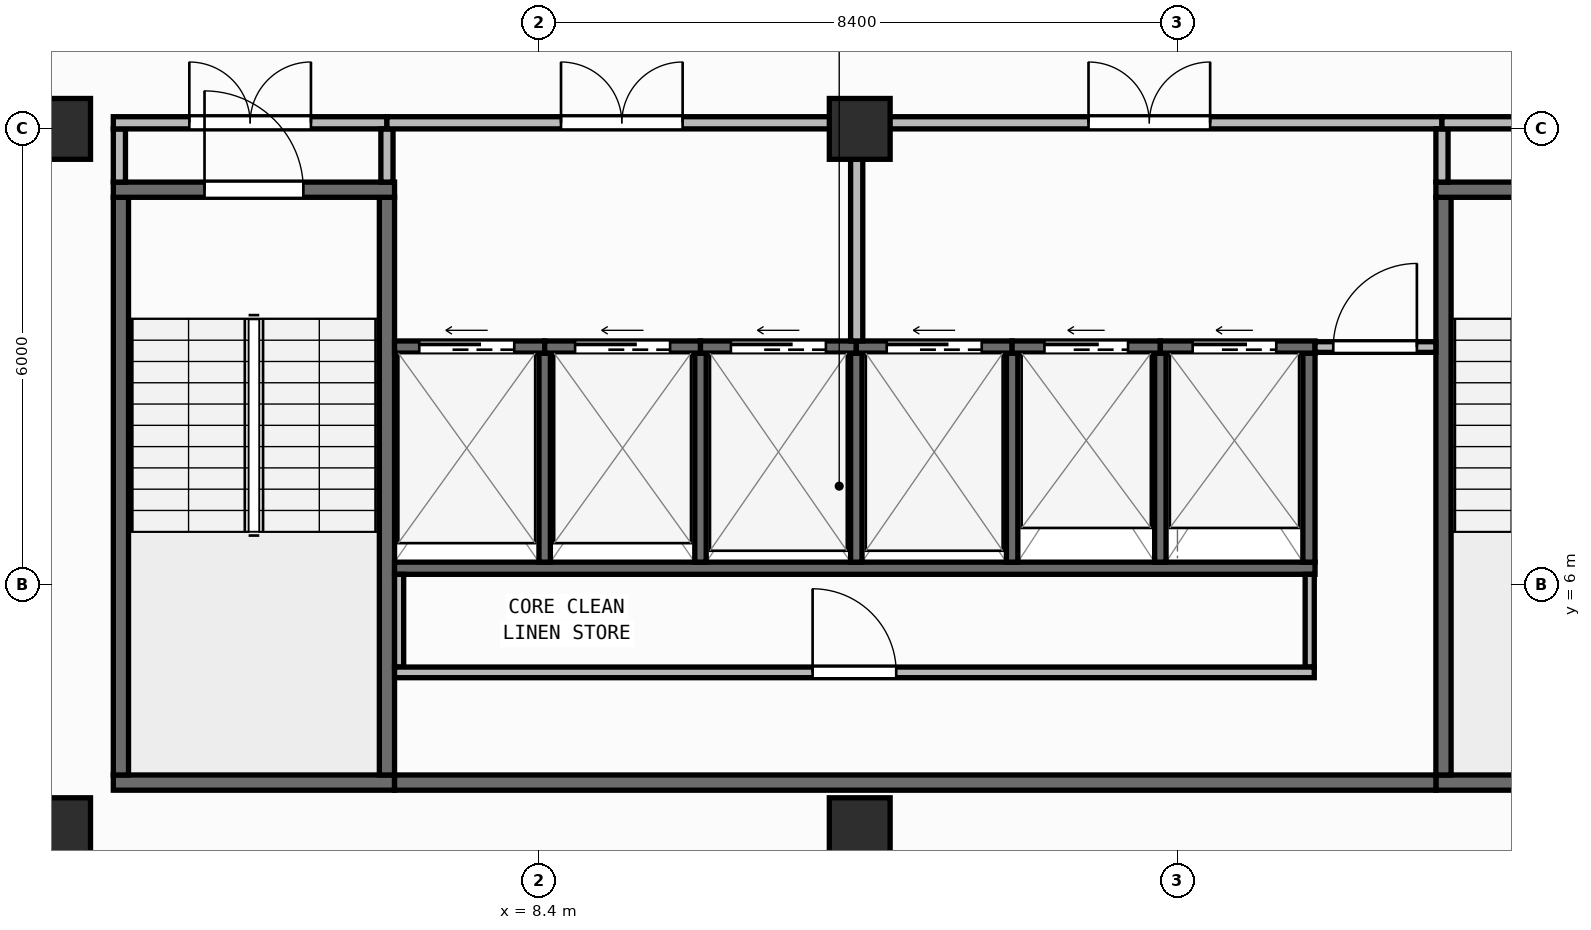
"""IFC4 building model, lengths in metres.
Left out: names, types, materials, properties, quantities, classifications, styles, units other than length and angle.
Written with IfcOpenShell. Run it as: python <this file> out.ifc"""

import sys

from ifc_helpers import new_model, si_unit, direction, frame, frame_2d, origin, origin_2d, place, context, subcontext, project, spatial, rectangle, extrude, element, fill, save


model = new_model("IFC4")
c1 = context("Model", 3, precision=1e-05, world=origin(), true_north=direction((0.0, 1.0)))
c2 = subcontext(c1, "Body", "Model", "MODEL_VIEW")
j1 = project(units=[si_unit("LENGTHUNIT", "METRE"), si_unit("PLANEANGLEUNIT", "RADIAN")], contexts=[c1])
p1 = place(None, origin())
s1 = spatial("IfcSite", under=j1, at=p1, CompositionType="ELEMENT")
p2 = place(p1, origin())
s2 = spatial("IfcBuilding", under=s1, at=p2, CompositionType="ELEMENT")
p3 = place(p2, frame((0.0, 0.0, 272.35)))
s3 = spatial("IfcBuildingStorey", under=s2, at=p3, CompositionType="ELEMENT", Elevation=272.35)
for number, where, z_axis, x_axis in (
    (1, (2.1, 2.8, 0.0), (0.0, 0.0, 1.0), (1.0, 0.0, 0.0)),
    (2, (12.62, 2.8, 0.0), (0.0, 0.0, 1.0), (1.0, 0.0, 0.0)),
    (3, (2.1, 12.0, 0.0), (0.0, 0.0, 1.0), (1.0, 0.0, 0.0)),
    (4, (12.62, 12.0, 0.0), (0.0, 0.0, 1.0), (1.0, 0.0, 0.0)),
):
    element("IfcColumn", number, at=place(p3, frame(where, z_axis=z_axis, x_axis=x_axis)), inside=s3, PredefinedType="COLUMN", context=c2, shape_type="SweptSolid", body=[
        extrude(rectangle(XDim=0.8, YDim=0.8, at=origin_2d()), origin(), (0.0, 0.0, 1.0), 3.95),
    ])
p4 = place(p3, frame((2.46, 0.172, 0.0), z_axis=(0.0, 0.0, 1.0), x_axis=(0.997289775118, 0.073573802713, 0.0)))
e5 = element("IfcWall", 5, at=p4, inside=s3, PredefinedType="STANDARD", context=c2, shape_type="SweptSolid", body=[
    extrude(rectangle(XDim=36.379, YDim=0.26, at=frame_2d((18.189, 0.0))), origin(), (0.0, 0.0, 1.0), 3.71),
])
p5 = place(p4, frame((16.989, 0.0, 0.9)))
e6 = element("IfcOpeningElement", 6, at=p5, cuts=e5, PredefinedType="OPENING", context=c2, shape_type="SweptSolid", body=[
    extrude(rectangle(XDim=2.4, YDim=1.65, at=frame_2d((1.2, 0.825))), frame((0.0, 0.14, 0.0), z_axis=(0.0, -1.0, 0.0), x_axis=(1.0, 0.0, 0.0)), (0.0, 0.0, 1.0), 0.28),
])
p6 = place(p3, frame((2.8, 3.4, 0.0), z_axis=(0.0, 0.0, 1.0), x_axis=(1.0, 0.0, 0.0)))
e7 = element("IfcWall", 7, at=p6, inside=s3, PredefinedType="SHEAR", context=c2, shape_type="SweptSolid", body=[
    extrude(rectangle(XDim=3.7, YDim=0.2, at=frame_2d((1.85, 0.0))), origin(), (0.0, 0.0, 1.0), 3.71),
])
for number, where, z_axis, x_axis in (
    (8, (2.9, 3.5, 0.0), (0.0, 0.0, 1.0), (0.0, 1.0, 0.0)),
    (9, (6.4, 3.5, 0.0), (0.0, 0.0, 1.0), (0.0, 1.0, 0.0)),
):
    element("IfcWall", number, at=place(p3, frame(where, z_axis=z_axis, x_axis=x_axis)), inside=s3, PredefinedType="SHEAR", context=c2, shape_type="SweptSolid", body=[
        extrude(rectangle(XDim=7.6, YDim=0.2, at=frame_2d((3.8, 0.0))), origin(), (0.0, 0.0, 1.0), 3.71),
    ])
p7 = place(p3, frame((2.8, 11.2, 0.0), z_axis=(0.0, 0.0, 1.0), x_axis=(1.0, 0.0, 0.0)))
e10 = element("IfcWall", 10, at=p7, inside=s3, PredefinedType="SHEAR", context=c2, shape_type="SweptSolid", body=[
    extrude(rectangle(XDim=3.7, YDim=0.2, at=frame_2d((1.85, 0.0))), origin(), (0.0, 0.0, 1.0), 3.71),
])
p8 = place(p7, frame((1.2, 0.0, 0.0)))
e11 = element("IfcOpeningElement", 11, at=p8, cuts=e10, PredefinedType="OPENING", context=c2, shape_type="SweptSolid", body=[
    extrude(rectangle(XDim=1.3, YDim=2.15, at=frame_2d((0.65, 1.075))), frame((0.0, 0.11, 0.0), z_axis=(0.0, -1.0, 0.0), x_axis=(1.0, 0.0, 0.0)), (0.0, 0.0, 1.0), 0.22),
])
p9 = place(p3, frame((20.2, 3.4, 0.0), z_axis=(0.0, 0.0, 1.0), x_axis=(1.0, 0.0, 0.0)))
e12 = element("IfcWall", 12, at=p9, inside=s3, PredefinedType="SHEAR", context=c2, shape_type="SweptSolid", body=[
    extrude(rectangle(XDim=3.7, YDim=0.2, at=frame_2d((1.85, 0.0))), origin(), (0.0, 0.0, 1.0), 3.71),
])
p10 = place(p3, frame((20.3, 3.5, 0.0), z_axis=(0.0, 0.0, 1.0), x_axis=(0.0, 1.0, 0.0)))
e13 = element("IfcWall", 13, at=p10, inside=s3, PredefinedType="SHEAR", context=c2, shape_type="SweptSolid", body=[
    extrude(rectangle(XDim=7.6, YDim=0.2, at=frame_2d((3.8, 0.0))), origin(), (0.0, 0.0, 1.0), 3.71),
])
p11 = place(p3, frame((20.2, 11.2, 0.0), z_axis=(0.0, 0.0, 1.0), x_axis=(1.0, 0.0, 0.0)))
e14 = element("IfcWall", 14, at=p11, inside=s3, PredefinedType="SHEAR", context=c2, shape_type="SweptSolid", body=[
    extrude(rectangle(XDim=3.7, YDim=0.2, at=frame_2d((1.85, 0.0))), origin(), (0.0, 0.0, 1.0), 3.71),
])
p12 = place(p11, frame((1.2, 0.0, 0.0)))
e15 = element("IfcOpeningElement", 15, at=p12, cuts=e14, PredefinedType="OPENING", context=c2, shape_type="SweptSolid", body=[
    extrude(rectangle(XDim=1.3, YDim=2.15, at=frame_2d((0.65, 1.075))), frame((0.0, 0.11, 0.0), z_axis=(0.0, -1.0, 0.0), x_axis=(1.0, 0.0, 0.0)), (0.0, 0.0, 1.0), 0.22),
])
p13 = place(p3, frame((6.5, 3.4, 0.0), z_axis=(0.0, 0.0, 1.0), x_axis=(1.0, 0.0, 0.0)))
e16 = element("IfcWall", 16, at=p13, inside=s3, PredefinedType="SHEAR", context=c2, shape_type="SweptSolid", body=[
    extrude(rectangle(XDim=13.7, YDim=0.2, at=frame_2d((6.85, 0.0))), origin(), (0.0, 0.0, 1.0), 3.71),
])
p14 = place(p3, frame((6.5, 6.22, 0.0), z_axis=(0.0, 0.0, 1.0), x_axis=(1.0, 0.0, 0.0)))
e17 = element("IfcWall", 17, at=p14, inside=s3, PredefinedType="SHEAR", context=c2, shape_type="SweptSolid", body=[
    extrude(rectangle(XDim=12.11, YDim=0.16, at=frame_2d((6.055, 0.0))), origin(), (0.0, 0.0, 1.0), 3.71),
])
p15 = place(p3, frame((18.53, 6.3, 0.0), z_axis=(0.0, 0.0, 1.0), x_axis=(0.0, 1.0, 0.0)))
e18 = element("IfcWall", 18, at=p15, inside=s3, PredefinedType="SHEAR", context=c2, shape_type="SweptSolid", body=[
    extrude(rectangle(XDim=2.75, YDim=0.16, at=frame_2d((1.375, 0.0))), origin(), (0.0, 0.0, 1.0), 3.71),
])
for number, where, z_axis, x_axis in (
    (19, (8.475, 6.3, 0.0), (0.0, 0.0, 1.0), (0.0, 1.0, 0.0)),
    (20, (10.525, 6.3, 0.0), (0.0, 0.0, 1.0), (0.0, 1.0, 0.0)),
    (21, (12.575, 6.3, 0.0), (0.0, 0.0, 1.0), (0.0, 1.0, 0.0)),
    (22, (14.625, 6.3, 0.0), (0.0, 0.0, 1.0), (0.0, 1.0, 0.0)),
    (23, (16.575, 6.3, 0.0), (0.0, 0.0, 1.0), (0.0, 1.0, 0.0)),
):
    element("IfcWall", number, at=place(p3, frame(where, z_axis=z_axis, x_axis=x_axis)), inside=s3, PredefinedType="SHEAR", context=c2, shape_type="SweptSolid", body=[
        extrude(rectangle(XDim=2.75, YDim=0.15, at=frame_2d((1.375, 0.0))), origin(), (0.0, 0.0, 1.0), 3.71),
    ])
p16 = place(p3, frame((6.5, 9.13, 0.0), z_axis=(0.0, 0.0, 1.0), x_axis=(1.0, 0.0, 0.0)))
e24 = element("IfcWall", 24, at=p16, inside=s3, PredefinedType="SHEAR", context=c2, shape_type="SweptSolid", body=[
    extrude(rectangle(XDim=1.975, YDim=0.16, at=frame_2d((0.988, 0.0))), origin(), (0.0, 0.0, 1.0), 3.71),
])
p17 = place(p16, frame((0.325, 0.0, 0.0)))
e25 = element("IfcOpeningElement", 25, at=p17, cuts=e24, PredefinedType="OPENING", context=c2, shape_type="SweptSolid", body=[
    extrude(rectangle(XDim=1.25, YDim=2.15, at=frame_2d((0.625, 1.075))), frame((0.0, 0.09, 0.0), z_axis=(0.0, -1.0, 0.0), x_axis=(1.0, 0.0, 0.0)), (0.0, 0.0, 1.0), 0.18),
])
p18 = place(p3, frame((8.475, 9.13, 0.0), z_axis=(0.0, 0.0, 1.0), x_axis=(1.0, 0.0, 0.0)))
e26 = element("IfcWall", 26, at=p18, inside=s3, PredefinedType="SHEAR", context=c2, shape_type="SweptSolid", body=[
    extrude(rectangle(XDim=2.05, YDim=0.16, at=frame_2d((1.025, 0.0))), origin(), (0.0, 0.0, 1.0), 3.71),
])
p19 = place(p18, frame((0.4, 0.0, 0.0)))
e27 = element("IfcOpeningElement", 27, at=p19, cuts=e26, PredefinedType="OPENING", context=c2, shape_type="SweptSolid", body=[
    extrude(rectangle(XDim=1.25, YDim=2.15, at=frame_2d((0.625, 1.075))), frame((0.0, 0.09, 0.0), z_axis=(0.0, -1.0, 0.0), x_axis=(1.0, 0.0, 0.0)), (0.0, 0.0, 1.0), 0.18),
])
p20 = place(p3, frame((10.525, 9.13, 0.0), z_axis=(0.0, 0.0, 1.0), x_axis=(1.0, 0.0, 0.0)))
e28 = element("IfcWall", 28, at=p20, inside=s3, PredefinedType="SHEAR", context=c2, shape_type="SweptSolid", body=[
    extrude(rectangle(XDim=2.05, YDim=0.16, at=frame_2d((1.025, 0.0))), origin(), (0.0, 0.0, 1.0), 3.71),
])
p21 = place(p20, frame((0.4, 0.0, 0.0)))
e29 = element("IfcOpeningElement", 29, at=p21, cuts=e28, PredefinedType="OPENING", context=c2, shape_type="SweptSolid", body=[
    extrude(rectangle(XDim=1.25, YDim=2.15, at=frame_2d((0.625, 1.075))), frame((0.0, 0.09, 0.0), z_axis=(0.0, -1.0, 0.0), x_axis=(1.0, 0.0, 0.0)), (0.0, 0.0, 1.0), 0.18),
])
p22 = place(p3, frame((12.575, 9.13, 0.0), z_axis=(0.0, 0.0, 1.0), x_axis=(1.0, 0.0, 0.0)))
e30 = element("IfcWall", 30, at=p22, inside=s3, PredefinedType="SHEAR", context=c2, shape_type="SweptSolid", body=[
    extrude(rectangle(XDim=2.05, YDim=0.16, at=frame_2d((1.025, 0.0))), origin(), (0.0, 0.0, 1.0), 3.71),
])
p23 = place(p22, frame((0.4, 0.0, 0.0)))
e31 = element("IfcOpeningElement", 31, at=p23, cuts=e30, PredefinedType="OPENING", context=c2, shape_type="SweptSolid", body=[
    extrude(rectangle(XDim=1.25, YDim=2.15, at=frame_2d((0.625, 1.075))), frame((0.0, 0.09, 0.0), z_axis=(0.0, -1.0, 0.0), x_axis=(1.0, 0.0, 0.0)), (0.0, 0.0, 1.0), 0.18),
])
p24 = place(p3, frame((14.625, 9.13, 0.0), z_axis=(0.0, 0.0, 1.0), x_axis=(1.0, 0.0, 0.0)))
e32 = element("IfcWall", 32, at=p24, inside=s3, PredefinedType="SHEAR", context=c2, shape_type="SweptSolid", body=[
    extrude(rectangle(XDim=1.95, YDim=0.16, at=frame_2d((0.975, 0.0))), origin(), (0.0, 0.0, 1.0), 3.71),
])
p25 = place(p24, frame((0.425, 0.0, 0.0)))
e33 = element("IfcOpeningElement", 33, at=p25, cuts=e32, PredefinedType="OPENING", context=c2, shape_type="SweptSolid", body=[
    extrude(rectangle(XDim=1.1, YDim=2.15, at=frame_2d((0.55, 1.075))), frame((0.0, 0.09, 0.0), z_axis=(0.0, -1.0, 0.0), x_axis=(1.0, 0.0, 0.0)), (0.0, 0.0, 1.0), 0.18),
])
p26 = place(p3, frame((16.575, 9.13, 0.0), z_axis=(0.0, 0.0, 1.0), x_axis=(1.0, 0.0, 0.0)))
e34 = element("IfcWall", 34, at=p26, inside=s3, PredefinedType="SHEAR", context=c2, shape_type="SweptSolid", body=[
    extrude(rectangle(XDim=2.035, YDim=0.16, at=frame_2d((1.018, 0.0))), origin(), (0.0, 0.0, 1.0), 3.71),
])
p27 = place(p26, frame((0.425, 0.0, 0.0)))
e35 = element("IfcOpeningElement", 35, at=p27, cuts=e34, PredefinedType="OPENING", context=c2, shape_type="SweptSolid", body=[
    extrude(rectangle(XDim=1.1, YDim=2.15, at=frame_2d((0.55, 1.075))), frame((0.0, 0.09, 0.0), z_axis=(0.0, -1.0, 0.0), x_axis=(1.0, 0.0, 0.0)), (0.0, 0.0, 1.0), 0.18),
])
for number, where, z_axis, x_axis in (
    (36, (6.56, 4.92, 0.0), (0.0, 0.0, 1.0), (0.0, 1.0, 0.0)),
    (37, (18.54, 4.92, 0.0), (0.0, 0.0, 1.0), (0.0, 1.0, 0.0)),
):
    element("IfcWall", number, at=place(p3, frame(where, z_axis=z_axis, x_axis=x_axis)), inside=s3, PredefinedType="PARTITIONING", context=c2, shape_type="SweptSolid", body=[
        extrude(rectangle(XDim=1.22, YDim=0.12, at=frame_2d((0.61, 0.0))), origin(), (0.0, 0.0, 1.0), 3.71),
    ])
p28 = place(p3, frame((6.5, 4.85, 0.0), z_axis=(0.0, 0.0, 1.0), x_axis=(1.0, 0.0, 0.0)))
e38 = element("IfcWall", 38, at=p28, inside=s3, PredefinedType="PARTITIONING", context=c2, shape_type="SweptSolid", body=[
    extrude(rectangle(XDim=12.1, YDim=0.14, at=frame_2d((6.05, 0.0))), origin(), (0.0, 0.0, 1.0), 3.71),
])
p29 = place(p28, frame((5.5, 0.0, 0.0)))
e39 = element("IfcOpeningElement", 39, at=p29, cuts=e38, PredefinedType="OPENING", context=c2, shape_type="SweptSolid", body=[
    extrude(rectangle(XDim=1.1, YDim=2.1, at=frame_2d((0.55, 1.05))), frame((0.0, 0.08, 0.0), z_axis=(0.0, -1.0, 0.0), x_axis=(1.0, 0.0, 0.0)), (0.0, 0.0, 1.0), 0.16),
])
p30 = place(p3, frame((18.61, 9.13, 0.0), z_axis=(0.0, 0.0, 1.0), x_axis=(1.0, 0.0, 0.0)))
e40 = element("IfcWall", 40, at=p30, inside=s3, PredefinedType="PARTITIONING", context=c2, shape_type="SweptSolid", body=[
    extrude(rectangle(XDim=1.59, YDim=0.14, at=frame_2d((0.795, 0.0))), origin(), (0.0, 0.0, 1.0), 3.71),
])
p31 = place(p30, frame((0.24, 0.0, 0.0)))
e41 = element("IfcOpeningElement", 41, at=p31, cuts=e40, PredefinedType="OPENING", context=c2, shape_type="SweptSolid", body=[
    extrude(rectangle(XDim=1.1, YDim=2.1, at=frame_2d((0.55, 1.05))), frame((0.0, 0.08, 0.0), z_axis=(0.0, -1.0, 0.0), x_axis=(1.0, 0.0, 0.0)), (0.0, 0.0, 1.0), 0.16),
])
p32 = place(p3, frame((2.88, 11.3, 0.0), z_axis=(0.0, 0.0, 1.0), x_axis=(0.0, 1.0, 0.0)))
e42 = element("IfcWall", 42, at=p32, inside=s3, PredefinedType="PARTITIONING", context=c2, shape_type="SweptSolid", body=[
    extrude(rectangle(XDim=0.7, YDim=0.16, at=frame_2d((0.35, 0.0))), origin(), (0.0, 0.0, 1.0), 3.71),
])
p33 = place(p3, frame((2.8, 12.08, 0.0), z_axis=(0.0, 0.0, 1.0), x_axis=(1.0, 0.0, 0.0)))
e43 = element("IfcWall", 43, at=p33, inside=s3, PredefinedType="PARTITIONING", context=c2, shape_type="SweptSolid", body=[
    extrude(rectangle(XDim=3.6, YDim=0.16, at=frame_2d((1.8, 0.0))), origin(), (0.0, 0.0, 1.0), 3.157),
])
p34 = place(p33, frame((1.0, 0.0, 0.0)))
e44 = element("IfcOpeningElement", 44, at=p34, cuts=e43, PredefinedType="OPENING", context=c2, shape_type="SweptSolid", body=[
    extrude(rectangle(XDim=1.6, YDim=2.05, at=frame_2d((0.8, 1.025))), frame((0.0, 0.09, 0.0), z_axis=(0.0, -1.0, 0.0), x_axis=(1.0, 0.0, 0.0)), (0.0, 0.0, 1.0), 0.18),
])
p35 = place(p3, frame((6.4, 11.3, 0.0), z_axis=(0.0, 0.0, 1.0), x_axis=(0.0, 1.0, 0.0)))
e45 = element("IfcWall", 45, at=p35, inside=s3, PredefinedType="PARTITIONING", context=c2, shape_type="SweptSolid", body=[
    extrude(rectangle(XDim=0.7, YDim=0.16, at=frame_2d((0.35, 0.0))), origin(), (0.0, 0.0, 1.0), 3.71),
])
p36 = place(p3, frame((6.4, 12.08, 0.0), z_axis=(0.0, 0.0, 1.0), x_axis=(1.0, 0.0, 0.0)))
e46 = element("IfcWall", 46, at=p36, inside=s3, PredefinedType="PARTITIONING", context=c2, shape_type="SweptSolid", body=[
    extrude(rectangle(XDim=6.18, YDim=0.16, at=frame_2d((3.09, 0.0))), origin(), (0.0, 0.0, 1.0), 3.157),
])
p37 = place(p36, frame((2.29, 0.0, 0.0)))
e47 = element("IfcOpeningElement", 47, at=p37, cuts=e46, PredefinedType="OPENING", context=c2, shape_type="SweptSolid", body=[
    extrude(rectangle(XDim=1.6, YDim=2.05, at=frame_2d((0.8, 1.025))), frame((0.0, 0.09, 0.0), z_axis=(0.0, -1.0, 0.0), x_axis=(1.0, 0.0, 0.0)), (0.0, 0.0, 1.0), 0.18),
])
p38 = place(p3, frame((12.58, 9.21, 0.0), z_axis=(0.0, 0.0, 1.0), x_axis=(0.0, 1.0, 0.0)))
e48 = element("IfcWall", 48, at=p38, inside=s3, PredefinedType="PARTITIONING", context=c2, shape_type="SweptSolid", body=[
    extrude(rectangle(XDim=2.79, YDim=0.16, at=frame_2d((1.395, 0.0))), origin(), (0.0, 0.0, 1.0), 3.71),
])
p39 = place(p3, frame((12.58, 12.08, 0.0), z_axis=(0.0, 0.0, 1.0), x_axis=(1.0, 0.0, 0.0)))
e49 = element("IfcWall", 49, at=p39, inside=s3, PredefinedType="PARTITIONING", context=c2, shape_type="SweptSolid", body=[
    extrude(rectangle(XDim=7.7, YDim=0.16, at=frame_2d((3.85, 0.0))), origin(), (0.0, 0.0, 1.0), 3.157),
])
p40 = place(p39, frame((3.05, 0.0, 0.0)))
e50 = element("IfcOpeningElement", 50, at=p40, cuts=e49, PredefinedType="OPENING", context=c2, shape_type="SweptSolid", body=[
    extrude(rectangle(XDim=1.6, YDim=2.05, at=frame_2d((0.8, 1.025))), frame((0.0, 0.09, 0.0), z_axis=(0.0, -1.0, 0.0), x_axis=(1.0, 0.0, 0.0)), (0.0, 0.0, 1.0), 0.18),
])
p41 = place(p3, frame((20.28, 11.3, 0.0), z_axis=(0.0, 0.0, 1.0), x_axis=(0.0, 1.0, 0.0)))
e51 = element("IfcWall", 51, at=p41, inside=s3, PredefinedType="PARTITIONING", context=c2, shape_type="SweptSolid", body=[
    extrude(rectangle(XDim=0.7, YDim=0.16, at=frame_2d((0.35, 0.0))), origin(), (0.0, 0.0, 1.0), 3.71),
])
p42 = place(p3, frame((20.28, 12.08, 0.0), z_axis=(0.0, 0.0, 1.0), x_axis=(1.0, 0.0, 0.0)))
e52 = element("IfcWall", 52, at=p42, inside=s3, PredefinedType="PARTITIONING", context=c2, shape_type="SweptSolid", body=[
    extrude(rectangle(XDim=3.62, YDim=0.16, at=frame_2d((1.81, 0.0))), origin(), (0.0, 0.0, 1.0), 3.157),
])
p43 = place(p42, frame((1.01, 0.0, 0.0)))
e53 = element("IfcOpeningElement", 53, at=p43, cuts=e52, PredefinedType="OPENING", context=c2, shape_type="SweptSolid", body=[
    extrude(rectangle(XDim=1.6, YDim=2.05, at=frame_2d((0.8, 1.025))), frame((0.0, 0.09, 0.0), z_axis=(0.0, -1.0, 0.0), x_axis=(1.0, 0.0, 0.0)), (0.0, 0.0, 1.0), 0.18),
])
p44 = place(p8, origin())
e54 = element("IfcDoor", 54, at=p44, inside=s3, OperationType="SINGLE_SWING_LEFT", PredefinedType="DOOR", context=c2, shape_type="SweptSolid", body=[
    extrude(rectangle(XDim=1.3, YDim=2.15, at=frame_2d((0.65, 1.075))), frame((0.0, 0.025, 0.0), z_axis=(0.0, -1.0, 0.0), x_axis=(1.0, 0.0, 0.0)), (0.0, 0.0, 1.0), 0.05),
])
fill(e11, e54)
p45 = place(p17, origin())
e55 = element("IfcDoor", 55, at=p45, inside=s3, OperationType="SLIDING_TO_LEFT", PredefinedType="DOOR", context=c2, shape_type="SweptSolid", body=[
    extrude(rectangle(XDim=1.25, YDim=2.15, at=frame_2d((0.625, 1.075))), frame((0.0, 0.025, 0.0), z_axis=(0.0, -1.0, 0.0), x_axis=(1.0, 0.0, 0.0)), (0.0, 0.0, 1.0), 0.05),
])
fill(e25, e55)
p46 = place(p19, origin())
e56 = element("IfcDoor", 56, at=p46, inside=s3, OperationType="SLIDING_TO_LEFT", PredefinedType="DOOR", context=c2, shape_type="SweptSolid", body=[
    extrude(rectangle(XDim=1.25, YDim=2.15, at=frame_2d((0.625, 1.075))), frame((0.0, 0.025, 0.0), z_axis=(0.0, -1.0, 0.0), x_axis=(1.0, 0.0, 0.0)), (0.0, 0.0, 1.0), 0.05),
])
fill(e27, e56)
p47 = place(p21, origin())
e57 = element("IfcDoor", 57, at=p47, inside=s3, OperationType="SLIDING_TO_LEFT", PredefinedType="DOOR", context=c2, shape_type="SweptSolid", body=[
    extrude(rectangle(XDim=1.25, YDim=2.15, at=frame_2d((0.625, 1.075))), frame((0.0, 0.025, 0.0), z_axis=(0.0, -1.0, 0.0), x_axis=(1.0, 0.0, 0.0)), (0.0, 0.0, 1.0), 0.05),
])
fill(e29, e57)
p48 = place(p23, origin())
e58 = element("IfcDoor", 58, at=p48, inside=s3, OperationType="SLIDING_TO_LEFT", PredefinedType="DOOR", context=c2, shape_type="SweptSolid", body=[
    extrude(rectangle(XDim=1.25, YDim=2.15, at=frame_2d((0.625, 1.075))), frame((0.0, 0.025, 0.0), z_axis=(0.0, -1.0, 0.0), x_axis=(1.0, 0.0, 0.0)), (0.0, 0.0, 1.0), 0.05),
])
fill(e31, e58)
p49 = place(p25, origin())
e59 = element("IfcDoor", 59, at=p49, inside=s3, OperationType="SLIDING_TO_LEFT", PredefinedType="DOOR", context=c2, shape_type="SweptSolid", body=[
    extrude(rectangle(XDim=1.1, YDim=2.15, at=frame_2d((0.55, 1.075))), frame((0.0, 0.025, 0.0), z_axis=(0.0, -1.0, 0.0), x_axis=(1.0, 0.0, 0.0)), (0.0, 0.0, 1.0), 0.05),
])
fill(e33, e59)
p50 = place(p27, origin())
e60 = element("IfcDoor", 60, at=p50, inside=s3, OperationType="SLIDING_TO_LEFT", PredefinedType="DOOR", context=c2, shape_type="SweptSolid", body=[
    extrude(rectangle(XDim=1.1, YDim=2.15, at=frame_2d((0.55, 1.075))), frame((0.0, 0.025, 0.0), z_axis=(0.0, -1.0, 0.0), x_axis=(1.0, 0.0, 0.0)), (0.0, 0.0, 1.0), 0.05),
])
fill(e35, e60)
p51 = place(p29, origin())
e61 = element("IfcDoor", 61, at=p51, inside=s3, OperationType="SINGLE_SWING_LEFT", PredefinedType="DOOR", context=c2, shape_type="SweptSolid", body=[
    extrude(rectangle(XDim=1.1, YDim=2.1, at=frame_2d((0.55, 1.05))), frame((0.0, 0.025, 0.0), z_axis=(0.0, -1.0, 0.0), x_axis=(1.0, 0.0, 0.0)), (0.0, 0.0, 1.0), 0.05),
])
fill(e39, e61)
p52 = place(p31, origin())
e62 = element("IfcDoor", 62, at=p52, inside=s3, OperationType="SINGLE_SWING_RIGHT", PredefinedType="DOOR", context=c2, shape_type="SweptSolid", body=[
    extrude(rectangle(XDim=1.1, YDim=2.1, at=frame_2d((0.55, 1.05))), frame((0.0, 0.025, 0.0), z_axis=(0.0, -1.0, 0.0), x_axis=(1.0, 0.0, 0.0)), (0.0, 0.0, 1.0), 0.05),
])
fill(e41, e62)
p53 = place(p34, origin())
e63 = element("IfcDoor", 63, at=p53, inside=s3, OperationType="DOUBLE_DOOR_SINGLE_SWING", PredefinedType="DOOR", context=c2, shape_type="SweptSolid", body=[
    extrude(rectangle(XDim=1.6, YDim=2.05, at=frame_2d((0.8, 1.025))), frame((0.0, 0.025, 0.0), z_axis=(0.0, -1.0, 0.0), x_axis=(1.0, 0.0, 0.0)), (0.0, 0.0, 1.0), 0.05),
])
fill(e44, e63)
p54 = place(p37, origin())
e64 = element("IfcDoor", 64, at=p54, inside=s3, OperationType="DOUBLE_DOOR_SINGLE_SWING", PredefinedType="DOOR", context=c2, shape_type="SweptSolid", body=[
    extrude(rectangle(XDim=1.6, YDim=2.05, at=frame_2d((0.8, 1.025))), frame((0.0, 0.025, 0.0), z_axis=(0.0, -1.0, 0.0), x_axis=(1.0, 0.0, 0.0)), (0.0, 0.0, 1.0), 0.05),
])
fill(e47, e64)
p55 = place(p40, origin())
e65 = element("IfcDoor", 65, at=p55, inside=s3, OperationType="DOUBLE_DOOR_SINGLE_SWING", PredefinedType="DOOR", context=c2, shape_type="SweptSolid", body=[
    extrude(rectangle(XDim=1.6, YDim=2.05, at=frame_2d((0.8, 1.025))), frame((0.0, 0.025, 0.0), z_axis=(0.0, -1.0, 0.0), x_axis=(1.0, 0.0, 0.0)), (0.0, 0.0, 1.0), 0.05),
])
fill(e50, e65)
save(model, sys.argv[1])
